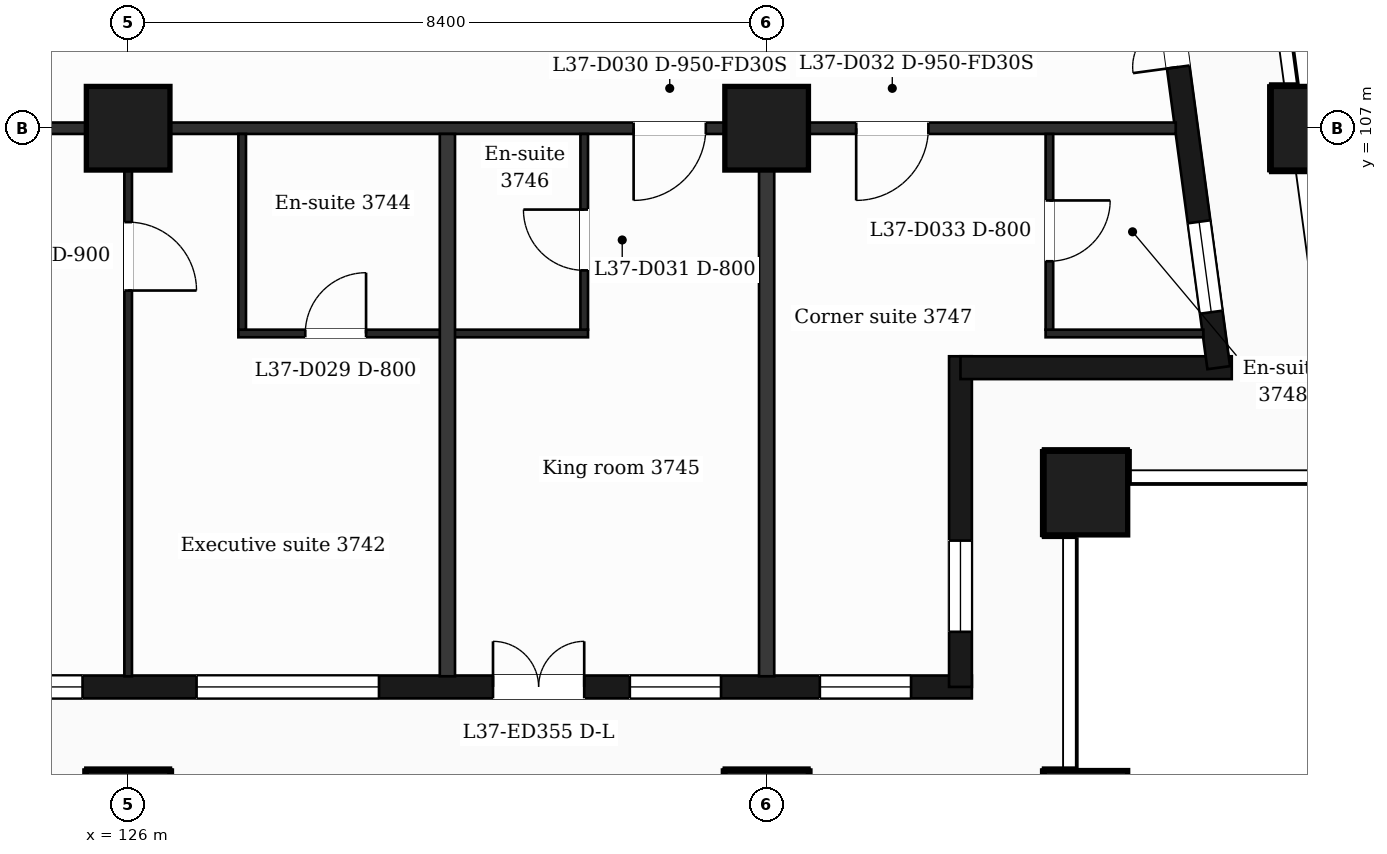
"""IFC4 building model, lengths in metres.
Left out: names, types, materials, properties, quantities, classifications, styles, units other than length and angle.
Written with IfcOpenShell. Run it as: python <this file> out.ifc"""

import sys

from ifc_helpers import new_model, si_unit, direction, frame, frame_2d, origin, origin_2d, place, context, subcontext, project, spatial, rectangle, extrude, element, fill, save


model = new_model("IFC4")
c1 = context("Model", 3, precision=1e-05, world=origin(), true_north=direction((0.0, 1.0)))
c2 = subcontext(c1, "Body", "Model", "MODEL_VIEW")
j1 = project(units=[si_unit("LENGTHUNIT", "METRE"), si_unit("PLANEANGLEUNIT", "RADIAN")], contexts=[c1])
p1 = place(None, origin())
s1 = spatial("IfcSite", under=j1, at=p1, CompositionType="ELEMENT")
p2 = place(p1, origin())
s2 = spatial("IfcBuilding", under=s1, at=p2, CompositionType="ELEMENT")
p3 = place(p2, frame((0.0, 0.0, 158.9)))
s3 = spatial("IfcBuildingStorey", under=s2, at=p3, CompositionType="ELEMENT", Elevation=158.9)
for number, where, z_axis, x_axis in (
    (1, (126.0, 98.0, 0.0), (0.0, 0.0, 1.0), (1.0, 0.0, 0.0)),
    (2, (134.4, 98.0, 0.0), (0.0, 0.0, 1.0), (1.0, 0.0, 0.0)),
    (3, (138.6, 98.0, 0.0), (0.0, 0.0, 1.0), (1.0, 0.0, 0.0)),
    (4, (138.6, 102.2, 0.0), (0.0, 0.0, 1.0), (1.0, 0.0, 0.0)),
    (5, (126.0, 107.0, 0.0), (0.0, 0.0, 1.0), (1.0, 0.0, 0.0)),
    (6, (134.4, 107.0, 0.0), (0.0, 0.0, 1.0), (1.0, 0.0, 0.0)),
    (7, (141.588, 107.0, 0.0), (0.0, 0.0, 1.0), (1.0, 0.0, 0.0)),
):
    element("IfcColumn", number, at=place(p3, frame(where, z_axis=z_axis, x_axis=x_axis)), inside=s3, PredefinedType="COLUMN", context=c2, shape_type="SweptSolid", body=[
        extrude(rectangle(XDim=1.1, YDim=1.1, at=origin_2d()), origin(), (0.0, 0.0, 1.0), 3.7),
    ])
p4 = place(p3, frame((89.85, 99.65, 0.0), z_axis=(0.0, 0.0, 1.0), x_axis=(1.0, 0.0, 0.0)))
e8 = element("IfcWall", 8, at=p4, inside=s3, PredefinedType="SOLIDWALL", context=c2, shape_type="SweptSolid", body=[
    extrude(rectangle(XDim=47.25, YDim=0.3, at=frame_2d((23.625, 0.0))), origin(), (0.0, 0.0, 1.0), 3.38),
])
p5 = place(p4, frame((0.725, 0.0, 0.9)))
e9 = element("IfcOpeningElement", 9, at=p5, cuts=e8, PredefinedType="OPENING", context=c2, shape_type="SweptSolid", body=[
    extrude(rectangle(XDim=1.2, YDim=2.1, at=frame_2d((0.6, 1.05))), frame((0.0, 0.16, 0.0), z_axis=(0.0, -1.0, 0.0), x_axis=(1.0, 0.0, 0.0)), (0.0, 0.0, 1.0), 0.32),
])
p6 = place(p4, frame((3.45, 0.0, 0.9)))
e10 = element("IfcOpeningElement", 10, at=p6, cuts=e8, PredefinedType="OPENING", context=c2, shape_type="SweptSolid", body=[
    extrude(rectangle(XDim=2.4, YDim=2.1, at=frame_2d((1.2, 1.05))), frame((0.0, 0.16, 0.0), z_axis=(0.0, -1.0, 0.0), x_axis=(1.0, 0.0, 0.0)), (0.0, 0.0, 1.0), 0.32),
])
p7 = place(p4, frame((7.65, 0.0, 0.9)))
e11 = element("IfcOpeningElement", 11, at=p7, cuts=e8, PredefinedType="OPENING", context=c2, shape_type="SweptSolid", body=[
    extrude(rectangle(XDim=2.4, YDim=2.1, at=frame_2d((1.2, 1.05))), frame((0.0, 0.16, 0.0), z_axis=(0.0, -1.0, 0.0), x_axis=(1.0, 0.0, 0.0)), (0.0, 0.0, 1.0), 0.32),
])
p8 = place(p4, frame((11.85, 0.0, 0.9)))
e12 = element("IfcOpeningElement", 12, at=p8, cuts=e8, PredefinedType="OPENING", context=c2, shape_type="SweptSolid", body=[
    extrude(rectangle(XDim=2.4, YDim=2.1, at=frame_2d((1.2, 1.05))), frame((0.0, 0.16, 0.0), z_axis=(0.0, -1.0, 0.0), x_axis=(1.0, 0.0, 0.0)), (0.0, 0.0, 1.0), 0.32),
])
p9 = place(p4, frame((16.05, 0.0, 0.9)))
e13 = element("IfcOpeningElement", 13, at=p9, cuts=e8, PredefinedType="OPENING", context=c2, shape_type="SweptSolid", body=[
    extrude(rectangle(XDim=2.4, YDim=2.1, at=frame_2d((1.2, 1.05))), frame((0.0, 0.16, 0.0), z_axis=(0.0, -1.0, 0.0), x_axis=(1.0, 0.0, 0.0)), (0.0, 0.0, 1.0), 0.32),
])
p10 = place(p4, frame((20.25, 0.0, 0.9)))
e14 = element("IfcOpeningElement", 14, at=p10, cuts=e8, PredefinedType="OPENING", context=c2, shape_type="SweptSolid", body=[
    extrude(rectangle(XDim=2.4, YDim=2.1, at=frame_2d((1.2, 1.05))), frame((0.0, 0.16, 0.0), z_axis=(0.0, -1.0, 0.0), x_axis=(1.0, 0.0, 0.0)), (0.0, 0.0, 1.0), 0.32),
])
p11 = place(p4, frame((25.05, 0.0, 0.9)))
e15 = element("IfcOpeningElement", 15, at=p11, cuts=e8, PredefinedType="OPENING", context=c2, shape_type="SweptSolid", body=[
    extrude(rectangle(XDim=1.2, YDim=2.1, at=frame_2d((0.6, 1.05))), frame((0.0, 0.16, 0.0), z_axis=(0.0, -1.0, 0.0), x_axis=(1.0, 0.0, 0.0)), (0.0, 0.0, 1.0), 0.32),
])
p12 = place(p4, frame((29.25, 0.0, 0.9)))
e16 = element("IfcOpeningElement", 16, at=p12, cuts=e8, PredefinedType="OPENING", context=c2, shape_type="SweptSolid", body=[
    extrude(rectangle(XDim=1.2, YDim=2.1, at=frame_2d((0.6, 1.05))), frame((0.0, 0.16, 0.0), z_axis=(0.0, -1.0, 0.0), x_axis=(1.0, 0.0, 0.0)), (0.0, 0.0, 1.0), 0.32),
])
p13 = place(p4, frame((32.55, 0.0, 0.0)))
e17 = element("IfcOpeningElement", 17, at=p13, cuts=e8, PredefinedType="OPENING", context=c2, shape_type="SweptSolid", body=[
    extrude(rectangle(XDim=1.2, YDim=2.4, at=frame_2d((0.6, 1.2))), frame((0.0, 0.16, 0.0), z_axis=(0.0, -1.0, 0.0), x_axis=(1.0, 0.0, 0.0)), (0.0, 0.0, 1.0), 0.32),
])
p14 = place(p4, frame((34.35, 0.0, 0.9)))
e18 = element("IfcOpeningElement", 18, at=p14, cuts=e8, PredefinedType="OPENING", context=c2, shape_type="SweptSolid", body=[
    extrude(rectangle(XDim=1.2, YDim=2.1, at=frame_2d((0.6, 1.05))), frame((0.0, 0.16, 0.0), z_axis=(0.0, -1.0, 0.0), x_axis=(1.0, 0.0, 0.0)), (0.0, 0.0, 1.0), 0.32),
])
p15 = place(p4, frame((37.05, 0.0, 0.9)))
e19 = element("IfcOpeningElement", 19, at=p15, cuts=e8, PredefinedType="OPENING", context=c2, shape_type="SweptSolid", body=[
    extrude(rectangle(XDim=2.4, YDim=2.1, at=frame_2d((1.2, 1.05))), frame((0.0, 0.16, 0.0), z_axis=(0.0, -1.0, 0.0), x_axis=(1.0, 0.0, 0.0)), (0.0, 0.0, 1.0), 0.32),
])
p16 = place(p4, frame((40.95, 0.0, 0.0)))
e20 = element("IfcOpeningElement", 20, at=p16, cuts=e8, PredefinedType="OPENING", context=c2, shape_type="SweptSolid", body=[
    extrude(rectangle(XDim=1.2, YDim=2.4, at=frame_2d((0.6, 1.2))), frame((0.0, 0.16, 0.0), z_axis=(0.0, -1.0, 0.0), x_axis=(1.0, 0.0, 0.0)), (0.0, 0.0, 1.0), 0.32),
])
p17 = place(p4, frame((42.75, 0.0, 0.9)))
e21 = element("IfcOpeningElement", 21, at=p17, cuts=e8, PredefinedType="OPENING", context=c2, shape_type="SweptSolid", body=[
    extrude(rectangle(XDim=1.2, YDim=2.1, at=frame_2d((0.6, 1.05))), frame((0.0, 0.16, 0.0), z_axis=(0.0, -1.0, 0.0), x_axis=(1.0, 0.0, 0.0)), (0.0, 0.0, 1.0), 0.32),
])
p18 = place(p4, frame((45.25, 0.0, 0.9)))
e22 = element("IfcOpeningElement", 22, at=p18, cuts=e8, PredefinedType="OPENING", context=c2, shape_type="SweptSolid", body=[
    extrude(rectangle(XDim=1.2, YDim=2.1, at=frame_2d((0.6, 1.05))), frame((0.0, 0.16, 0.0), z_axis=(0.0, -1.0, 0.0), x_axis=(1.0, 0.0, 0.0)), (0.0, 0.0, 1.0), 0.32),
])
p19 = place(p3, frame((136.95, 99.65, 0.0), z_axis=(0.0, 0.0, 1.0), x_axis=(0.0, 1.0, 0.0)))
e23 = element("IfcWall", 23, at=p19, inside=s3, PredefinedType="SOLIDWALL", context=c2, shape_type="SweptSolid", body=[
    extrude(rectangle(XDim=4.35, YDim=0.3, at=frame_2d((2.175, 0.0))), origin(), (0.0, 0.0, 1.0), 3.38),
])
p20 = place(p19, frame((0.725, 0.0, 0.9)))
e24 = element("IfcOpeningElement", 24, at=p20, cuts=e23, PredefinedType="OPENING", context=c2, shape_type="SweptSolid", body=[
    extrude(rectangle(XDim=1.2, YDim=2.1, at=frame_2d((0.6, 1.05))), frame((0.0, 0.16, 0.0), z_axis=(0.0, -1.0, 0.0), x_axis=(1.0, 0.0, 0.0)), (0.0, 0.0, 1.0), 0.32),
])
p21 = place(p3, frame((136.95, 103.85, 0.0), z_axis=(0.0, 0.0, 1.0), x_axis=(1.0, 0.0, 0.0)))
e25 = element("IfcWall", 25, at=p21, inside=s3, PredefinedType="SOLIDWALL", context=c2, shape_type="SweptSolid", body=[
    extrude(rectangle(XDim=3.569, YDim=0.3, at=frame_2d((1.785, 0.0))), origin(), (0.0, 0.0, 1.0), 3.38),
])
p22 = place(p3, frame((140.348, 103.85, 0.0), z_axis=(0.0, 0.0, 1.0), x_axis=(-0.133431549479, 0.991058031401, 0.0)))
e26 = element("IfcWall", 26, at=p22, inside=s3, PredefinedType="SOLIDWALL", context=c2, shape_type="SweptSolid", body=[
    extrude(rectangle(XDim=6.609, YDim=0.3, at=frame_2d((3.304, 0.0))), origin(), (0.0, 0.0, 1.0), 3.38),
])
p23 = place(p22, frame((0.737, 0.0, 0.9)))
e27 = element("IfcOpeningElement", 27, at=p23, cuts=e26, PredefinedType="OPENING", context=c2, shape_type="SweptSolid", body=[
    extrude(rectangle(XDim=1.2, YDim=2.1, at=frame_2d((0.6, 1.05))), frame((0.0, 0.16, 0.0), z_axis=(0.0, -1.0, 0.0), x_axis=(1.0, 0.0, 0.0)), (0.0, 0.0, 1.0), 0.32),
])
p24 = place(p22, frame((3.991, 0.0, 0.0)))
e28 = element("IfcOpeningElement", 28, at=p24, cuts=e26, PredefinedType="OPENING", context=c2, shape_type="SweptSolid", body=[
    extrude(rectangle(XDim=1.2, YDim=2.4, at=frame_2d((0.6, 1.2))), frame((0.0, 0.16, 0.0), z_axis=(0.0, -1.0, 0.0), x_axis=(1.0, 0.0, 0.0)), (0.0, 0.0, 1.0), 0.32),
])
p25 = place(p3, frame((127.45, 104.3, 0.0), z_axis=(0.0, 0.0, 1.0), x_axis=(1.0, 0.0, 0.0)))
e29 = element("IfcWall", 29, at=p25, inside=s3, PredefinedType="PARTITIONING", context=c2, shape_type="SweptSolid", body=[
    extrude(rectangle(XDim=4.6, YDim=0.1, at=frame_2d((2.3, 0.0))), origin(), (0.0, 0.0, 1.0), 3.38),
])
p26 = place(p25, frame((0.88, 0.0, 0.0)))
e30 = element("IfcOpeningElement", 30, at=p26, cuts=e29, PredefinedType="OPENING", context=c2, shape_type="SweptSolid", body=[
    extrude(rectangle(XDim=0.8, YDim=2.1, at=frame_2d((0.4, 1.05))), frame((0.0, 0.06, 0.0), z_axis=(0.0, -1.0, 0.0), x_axis=(1.0, 0.0, 0.0)), (0.0, 0.0, 1.0), 0.12),
])
p27 = place(p3, frame((138.07, 104.3, 0.0), z_axis=(0.0, 0.0, 1.0), x_axis=(1.0, 0.0, 0.0)))
e31 = element("IfcWall", 31, at=p27, inside=s3, PredefinedType="PARTITIONING", context=c2, shape_type="SweptSolid", body=[
    extrude(rectangle(XDim=2.076, YDim=0.1, at=frame_2d((1.038, 0.0))), origin(), (0.0, 0.0, 1.0), 3.38),
])
p28 = place(p3, frame((87.018, 107.0, 0.0), z_axis=(0.0, 0.0, 1.0), x_axis=(1.0, 0.0, 0.0)))
e32 = element("IfcWall", 32, at=p28, inside=s3, PredefinedType="PARTITIONING", context=c2, shape_type="SweptSolid", body=[
    extrude(rectangle(XDim=52.765, YDim=0.15, at=frame_2d((26.382, 0.0))), origin(), (0.0, 0.0, 1.0), 3.38),
])
p29 = place(p28, frame((1.032, 0.0, 0.0)))
e33 = element("IfcOpeningElement", 33, at=p29, cuts=e32, PredefinedType="OPENING", context=c2, shape_type="SweptSolid", body=[
    extrude(rectangle(XDim=0.95, YDim=2.1, at=frame_2d((0.475, 1.05))), frame((0.0, 0.085, 0.0), z_axis=(0.0, -1.0, 0.0), x_axis=(1.0, 0.0, 0.0)), (0.0, 0.0, 1.0), 0.17),
])
p30 = place(p28, frame((6.369, 0.0, 0.0)))
e34 = element("IfcOpeningElement", 34, at=p30, cuts=e32, PredefinedType="OPENING", context=c2, shape_type="SweptSolid", body=[
    extrude(rectangle(XDim=0.95, YDim=2.1, at=frame_2d((0.475, 1.05))), frame((0.0, 0.085, 0.0), z_axis=(0.0, -1.0, 0.0), x_axis=(1.0, 0.0, 0.0)), (0.0, 0.0, 1.0), 0.17),
])
p31 = place(p28, frame((16.812, 0.0, 0.0)))
e35 = element("IfcOpeningElement", 35, at=p31, cuts=e32, PredefinedType="OPENING", context=c2, shape_type="SweptSolid", body=[
    extrude(rectangle(XDim=1.0, YDim=2.1, at=frame_2d((0.5, 1.05))), frame((0.0, 0.085, 0.0), z_axis=(0.0, -1.0, 0.0), x_axis=(1.0, 0.0, 0.0)), (0.0, 0.0, 1.0), 0.17),
])
p32 = place(p28, frame((25.157, 0.0, 0.0)))
e36 = element("IfcOpeningElement", 36, at=p32, cuts=e32, PredefinedType="OPENING", context=c2, shape_type="SweptSolid", body=[
    extrude(rectangle(XDim=0.95, YDim=2.1, at=frame_2d((0.475, 1.05))), frame((0.0, 0.085, 0.0), z_axis=(0.0, -1.0, 0.0), x_axis=(1.0, 0.0, 0.0)), (0.0, 0.0, 1.0), 0.17),
])
p33 = place(p28, frame((28.867, 0.0, 0.0)))
e37 = element("IfcOpeningElement", 37, at=p33, cuts=e32, PredefinedType="OPENING", context=c2, shape_type="SweptSolid", body=[
    extrude(rectangle(XDim=0.95, YDim=2.1, at=frame_2d((0.475, 1.05))), frame((0.0, 0.085, 0.0), z_axis=(0.0, -1.0, 0.0), x_axis=(1.0, 0.0, 0.0)), (0.0, 0.0, 1.0), 0.17),
])
p34 = place(p28, frame((34.952, 0.0, 0.0)))
e38 = element("IfcOpeningElement", 38, at=p34, cuts=e32, PredefinedType="OPENING", context=c2, shape_type="SweptSolid", body=[
    extrude(rectangle(XDim=1.0, YDim=2.1, at=frame_2d((0.5, 1.05))), frame((0.0, 0.085, 0.0), z_axis=(0.0, -1.0, 0.0), x_axis=(1.0, 0.0, 0.0)), (0.0, 0.0, 1.0), 0.17),
])
p35 = place(p28, frame((45.632, 0.0, 0.0)))
e39 = element("IfcOpeningElement", 39, at=p35, cuts=e32, PredefinedType="OPENING", context=c2, shape_type="SweptSolid", body=[
    extrude(rectangle(XDim=0.95, YDim=2.1, at=frame_2d((0.475, 1.05))), frame((0.0, 0.085, 0.0), z_axis=(0.0, -1.0, 0.0), x_axis=(1.0, 0.0, 0.0)), (0.0, 0.0, 1.0), 0.17),
])
p36 = place(p28, frame((48.56, 0.0, 0.0)))
e40 = element("IfcOpeningElement", 40, at=p36, cuts=e32, PredefinedType="OPENING", context=c2, shape_type="SweptSolid", body=[
    extrude(rectangle(XDim=0.95, YDim=2.1, at=frame_2d((0.475, 1.05))), frame((0.0, 0.085, 0.0), z_axis=(0.0, -1.0, 0.0), x_axis=(1.0, 0.0, 0.0)), (0.0, 0.0, 1.0), 0.17),
])
p37 = place(p3, frame((126.0, 99.79, 0.0), z_axis=(0.0, 0.0, 1.0), x_axis=(0.0, 1.0, 0.0)))
e41 = element("IfcWall", 41, at=p37, inside=s3, PredefinedType="PARTITIONING", context=c2, shape_type="SweptSolid", body=[
    extrude(rectangle(XDim=7.135, YDim=0.1, at=frame_2d((3.567, 0.0))), origin(), (0.0, 0.0, 1.0), 3.38),
])
p38 = place(p37, frame((5.075, 0.0, 0.0)))
e42 = element("IfcOpeningElement", 42, at=p38, cuts=e41, PredefinedType="OPENING", context=c2, shape_type="SweptSolid", body=[
    extrude(rectangle(XDim=0.9, YDim=2.1, at=frame_2d((0.45, 1.05))), frame((0.0, 0.06, 0.0), z_axis=(0.0, -1.0, 0.0), x_axis=(1.0, 0.0, 0.0)), (0.0, 0.0, 1.0), 0.12),
])
p39 = place(p3, frame((127.5, 104.35, 0.0), z_axis=(0.0, 0.0, 1.0), x_axis=(0.0, 1.0, 0.0)))
e43 = element("IfcWall", 43, at=p39, inside=s3, PredefinedType="PARTITIONING", context=c2, shape_type="SweptSolid", body=[
    extrude(rectangle(XDim=2.575, YDim=0.1, at=frame_2d((1.288, 0.0))), origin(), (0.0, 0.0, 1.0), 3.38),
])
p40 = place(p3, frame((130.2, 99.79, 0.0), z_axis=(0.0, 0.0, 1.0), x_axis=(0.0, 1.0, 0.0)))
e44 = element("IfcWall", 44, at=p40, inside=s3, PredefinedType="PARTITIONING", context=c2, shape_type="SweptSolid", body=[
    extrude(rectangle(XDim=7.135, YDim=0.2, at=frame_2d((3.567, 0.0))), origin(), (0.0, 0.0, 1.0), 3.38),
])
p41 = place(p3, frame((132.0, 104.35, 0.0), z_axis=(0.0, 0.0, 1.0), x_axis=(0.0, 1.0, 0.0)))
e45 = element("IfcWall", 45, at=p41, inside=s3, PredefinedType="PARTITIONING", context=c2, shape_type="SweptSolid", body=[
    extrude(rectangle(XDim=2.575, YDim=0.1, at=frame_2d((1.288, 0.0))), origin(), (0.0, 0.0, 1.0), 3.38),
])
p42 = place(p41, frame((0.78, 0.0, 0.0)))
e46 = element("IfcOpeningElement", 46, at=p42, cuts=e45, PredefinedType="OPENING", context=c2, shape_type="SweptSolid", body=[
    extrude(rectangle(XDim=0.8, YDim=2.1, at=frame_2d((0.4, 1.05))), frame((0.0, 0.06, 0.0), z_axis=(0.0, -1.0, 0.0), x_axis=(1.0, 0.0, 0.0)), (0.0, 0.0, 1.0), 0.12),
])
p43 = place(p3, frame((134.4, 99.79, 0.0), z_axis=(0.0, 0.0, 1.0), x_axis=(0.0, 1.0, 0.0)))
e47 = element("IfcWall", 47, at=p43, inside=s3, PredefinedType="PARTITIONING", context=c2, shape_type="SweptSolid", body=[
    extrude(rectangle(XDim=7.135, YDim=0.2, at=frame_2d((3.567, 0.0))), origin(), (0.0, 0.0, 1.0), 3.38),
])
p44 = place(p3, frame((138.12, 104.35, 0.0), z_axis=(0.0, 0.0, 1.0), x_axis=(0.0, 1.0, 0.0)))
e48 = element("IfcWall", 48, at=p44, inside=s3, PredefinedType="PARTITIONING", context=c2, shape_type="SweptSolid", body=[
    extrude(rectangle(XDim=2.575, YDim=0.1, at=frame_2d((1.288, 0.0))), origin(), (0.0, 0.0, 1.0), 3.38),
])
p45 = place(p44, frame((0.9, 0.0, 0.0)))
e49 = element("IfcOpeningElement", 49, at=p45, cuts=e48, PredefinedType="OPENING", context=c2, shape_type="SweptSolid", body=[
    extrude(rectangle(XDim=0.8, YDim=2.1, at=frame_2d((0.4, 1.05))), frame((0.0, 0.06, 0.0), z_axis=(0.0, -1.0, 0.0), x_axis=(1.0, 0.0, 0.0)), (0.0, 0.0, 1.0), 0.12),
])
p46 = place(p14, origin())
e50 = element("IfcWindow", 50, at=p46, inside=s3, PartitioningType="SINGLE_PANEL", PredefinedType="WINDOW", context=c2, shape_type="SweptSolid", body=[
    extrude(rectangle(XDim=1.2, YDim=2.1, at=frame_2d((0.6, 1.05))), frame((0.0, 0.03, 0.0), z_axis=(0.0, -1.0, 0.0), x_axis=(1.0, 0.0, 0.0)), (0.0, 0.0, 1.0), 0.06),
])
fill(e18, e50)
p47 = place(p15, origin())
e51 = element("IfcWindow", 51, at=p47, inside=s3, PartitioningType="SINGLE_PANEL", PredefinedType="WINDOW", context=c2, shape_type="SweptSolid", body=[
    extrude(rectangle(XDim=2.4, YDim=2.1, at=frame_2d((1.2, 1.05))), frame((0.0, 0.03, 0.0), z_axis=(0.0, -1.0, 0.0), x_axis=(1.0, 0.0, 0.0)), (0.0, 0.0, 1.0), 0.06),
])
fill(e19, e51)
p48 = place(p16, origin())
e52 = element("IfcDoor", 52, at=p48, inside=s3, OperationType="DOUBLE_DOOR_SINGLE_SWING", PredefinedType="DOOR", context=c2, shape_type="SweptSolid", body=[
    extrude(rectangle(XDim=1.2, YDim=2.4, at=frame_2d((0.6, 1.2))), frame((0.0, 0.025, 0.0), z_axis=(0.0, -1.0, 0.0), x_axis=(1.0, 0.0, 0.0)), (0.0, 0.0, 1.0), 0.05),
])
fill(e20, e52)
p49 = place(p17, origin())
e53 = element("IfcWindow", 53, at=p49, inside=s3, PartitioningType="SINGLE_PANEL", PredefinedType="WINDOW", context=c2, shape_type="SweptSolid", body=[
    extrude(rectangle(XDim=1.2, YDim=2.1, at=frame_2d((0.6, 1.05))), frame((0.0, 0.03, 0.0), z_axis=(0.0, -1.0, 0.0), x_axis=(1.0, 0.0, 0.0)), (0.0, 0.0, 1.0), 0.06),
])
fill(e21, e53)
p50 = place(p18, origin())
e54 = element("IfcWindow", 54, at=p50, inside=s3, PartitioningType="SINGLE_PANEL", PredefinedType="WINDOW", context=c2, shape_type="SweptSolid", body=[
    extrude(rectangle(XDim=1.2, YDim=2.1, at=frame_2d((0.6, 1.05))), frame((0.0, 0.03, 0.0), z_axis=(0.0, -1.0, 0.0), x_axis=(1.0, 0.0, 0.0)), (0.0, 0.0, 1.0), 0.06),
])
fill(e22, e54)
p51 = place(p20, origin())
e55 = element("IfcWindow", 55, at=p51, inside=s3, PartitioningType="SINGLE_PANEL", PredefinedType="WINDOW", context=c2, shape_type="SweptSolid", body=[
    extrude(rectangle(XDim=1.2, YDim=2.1, at=frame_2d((0.6, 1.05))), frame((0.0, 0.03, 0.0), z_axis=(0.0, -1.0, 0.0), x_axis=(1.0, 0.0, 0.0)), (0.0, 0.0, 1.0), 0.06),
])
fill(e24, e55)
p52 = place(p23, origin())
e56 = element("IfcWindow", 56, at=p52, inside=s3, PartitioningType="SINGLE_PANEL", PredefinedType="WINDOW", context=c2, shape_type="SweptSolid", body=[
    extrude(rectangle(XDim=1.2, YDim=2.1, at=frame_2d((0.6, 1.05))), frame((0.0, 0.03, 0.0), z_axis=(0.0, -1.0, 0.0), x_axis=(1.0, 0.0, 0.0)), (0.0, 0.0, 1.0), 0.06),
])
fill(e27, e56)
p53 = place(p24, origin())
e57 = element("IfcDoor", 57, at=p53, inside=s3, OperationType="DOUBLE_DOOR_SINGLE_SWING", PredefinedType="DOOR", context=c2, shape_type="SweptSolid", body=[
    extrude(rectangle(XDim=1.2, YDim=2.4, at=frame_2d((0.6, 1.2))), frame((0.0, 0.025, 0.0), z_axis=(0.0, -1.0, 0.0), x_axis=(1.0, 0.0, 0.0)), (0.0, 0.0, 1.0), 0.05),
])
fill(e28, e57)
p54 = place(p38, origin())
e58 = element("IfcDoor", 58, at=p54, inside=s3, OperationType="SINGLE_SWING_LEFT", PredefinedType="DOOR", context=c2, shape_type="SweptSolid", body=[
    extrude(rectangle(XDim=0.9, YDim=2.1, at=frame_2d((0.45, 1.05))), frame((0.0, 0.025, 0.0), z_axis=(0.0, -1.0, 0.0), x_axis=(1.0, 0.0, 0.0)), (0.0, 0.0, 1.0), 0.05),
])
fill(e42, e58)
p55 = place(p26, origin())
e59 = element("IfcDoor", 59, at=p55, inside=s3, OperationType="SINGLE_SWING_RIGHT", PredefinedType="DOOR", context=c2, shape_type="SweptSolid", body=[
    extrude(rectangle(XDim=0.8, YDim=2.1, at=frame_2d((0.4, 1.05))), frame((0.0, 0.025, 0.0), z_axis=(0.0, -1.0, 0.0), x_axis=(1.0, 0.0, 0.0)), (0.0, 0.0, 1.0), 0.05),
])
fill(e30, e59)
p56 = place(p35, origin())
e60 = element("IfcDoor", 60, at=p56, inside=s3, OperationType="SINGLE_SWING_LEFT", PredefinedType="DOOR", context=c2, shape_type="SweptSolid", body=[
    extrude(rectangle(XDim=0.95, YDim=2.1, at=frame_2d((0.475, 1.05))), frame((0.0, 0.025, 0.0), z_axis=(0.0, -1.0, 0.0), x_axis=(1.0, 0.0, 0.0)), (0.0, 0.0, 1.0), 0.05),
])
fill(e39, e60)
p57 = place(p42, origin())
e61 = element("IfcDoor", 61, at=p57, inside=s3, OperationType="SINGLE_SWING_RIGHT", PredefinedType="DOOR", context=c2, shape_type="SweptSolid", body=[
    extrude(rectangle(XDim=0.8, YDim=2.1, at=frame_2d((0.4, 1.05))), frame((0.0, 0.025, 0.0), z_axis=(0.0, -1.0, 0.0), x_axis=(1.0, 0.0, 0.0)), (0.0, 0.0, 1.0), 0.05),
])
fill(e46, e61)
p58 = place(p36, origin())
e62 = element("IfcDoor", 62, at=p58, inside=s3, OperationType="SINGLE_SWING_LEFT", PredefinedType="DOOR", context=c2, shape_type="SweptSolid", body=[
    extrude(rectangle(XDim=0.95, YDim=2.1, at=frame_2d((0.475, 1.05))), frame((0.0, 0.025, 0.0), z_axis=(0.0, -1.0, 0.0), x_axis=(1.0, 0.0, 0.0)), (0.0, 0.0, 1.0), 0.05),
])
fill(e40, e62)
p59 = place(p45, origin())
e63 = element("IfcDoor", 63, at=p59, inside=s3, OperationType="SINGLE_SWING_RIGHT", PredefinedType="DOOR", context=c2, shape_type="SweptSolid", body=[
    extrude(rectangle(XDim=0.8, YDim=2.1, at=frame_2d((0.4, 1.05))), frame((0.0, 0.025, 0.0), z_axis=(0.0, -1.0, 0.0), x_axis=(1.0, 0.0, 0.0)), (0.0, 0.0, 1.0), 0.05),
])
fill(e49, e63)
save(model, sys.argv[1])
